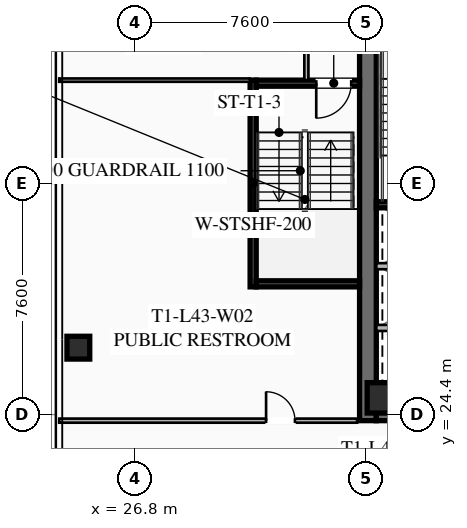
"""IFC4 building model, lengths in metres.
Left out: names, types, materials, properties, quantities, classifications, styles, units other than length and angle.
Written with IfcOpenShell. Run it as: python <this file> out.ifc"""

import sys

from ifc_helpers import new_model, si_unit, direction, frame, frame_2d, origin, origin_2d, place, context, subcontext, project, spatial, rectangle, hollow_rectangle, extrude, element, fill, save


model = new_model("IFC4")
c1 = context("Model", 3, precision=1e-05, world=origin(), true_north=direction((0.0, 1.0)))
c2 = subcontext(c1, "Body", "Model", "MODEL_VIEW")
j1 = project(units=[si_unit("LENGTHUNIT", "METRE"), si_unit("PLANEANGLEUNIT", "RADIAN")], contexts=[c1])
p1 = place(None, origin())
s1 = spatial("IfcSite", under=j1, at=p1, CompositionType="ELEMENT")
p2 = place(p1, origin())
s2 = spatial("IfcBuilding", under=s1, at=p2, CompositionType="ELEMENT")
p3 = place(p2, frame((0.0, 0.0, 160.55)))
s3 = spatial("IfcBuildingStorey", under=s2, at=p3, CompositionType="ELEMENT", Elevation=160.55)
p4 = place(p3, frame((34.475, 24.2, 0.0), z_axis=(0.0, 0.0, 1.0), x_axis=(0.0, 1.0, 0.0)))
e1 = element("IfcWall", 1, at=p4, inside=s3, PredefinedType="SHEAR", context=c2, shape_type="SweptSolid", body=[
    extrude(rectangle(XDim=15.6, YDim=0.55, at=frame_2d((7.8, 0.0))), origin(), (0.0, 0.0, 1.0), 3.55),
])
p5 = place(p3, frame((49.25, 24.475, 0.0), z_axis=(0.0, 0.0, 1.0), x_axis=(-1.0, 0.0, 0.0)))
e2 = element("IfcWall", 2, at=p5, inside=s3, PredefinedType="SHEAR", context=c2, shape_type="SweptSolid", body=[
    extrude(rectangle(XDim=14.5, YDim=0.55, at=frame_2d((7.25, 0.0))), origin(), (0.0, 0.0, 1.0), 3.55),
])
p6 = place(p5, frame((8.95, 0.0, 0.0)))
e3 = element("IfcOpeningElement", 3, at=p6, cuts=e2, PredefinedType="OPENING", context=c2, shape_type="SweptSolid", body=[
    extrude(rectangle(XDim=1.25, YDim=2.25, at=frame_2d((0.625, 1.125))), frame((0.0, 0.285, 0.0), z_axis=(0.0, -1.0, 0.0), x_axis=(1.0, 0.0, 0.0)), (0.0, 0.0, 1.0), 0.57),
])
p7 = place(p5, frame((3.9, 0.0, 0.0)))
e4 = element("IfcOpeningElement", 4, at=p7, cuts=e2, PredefinedType="OPENING", context=c2, shape_type="SweptSolid", body=[
    extrude(rectangle(XDim=1.25, YDim=2.25, at=frame_2d((0.625, 1.125))), frame((0.0, 0.285, 0.0), z_axis=(0.0, -1.0, 0.0), x_axis=(1.0, 0.0, 0.0)), (0.0, 0.0, 1.0), 0.57),
])
p8 = place(p3, frame((34.95, 24.95, 0.0), z_axis=(0.0, 0.0, 1.0), x_axis=(1.0, 0.0, 0.0)))
e5 = element("IfcColumn", 5, at=p8, inside=s3, PredefinedType="COLUMN", context=c2, shape_type="SweptSolid", body=[
    extrude(hollow_rectangle(XDim=1.0, YDim=1.0, WallThickness=0.04, at=origin_2d()), origin(), (0.0, 0.0, 1.0), 3.37),
])
p9 = place(p3, frame((24.95, 26.6, 0.0), z_axis=(0.0, 0.0, 1.0), x_axis=(1.0, 0.0, 0.0)))
e6 = element("IfcColumn", 6, at=p9, inside=s3, PredefinedType="COLUMN", context=c2, shape_type="SweptSolid", body=[
    extrude(hollow_rectangle(XDim=0.75, YDim=0.75, WallThickness=0.032, at=origin_2d()), origin(), (0.0, 0.0, 1.0), 3.37),
])
p10 = place(p3, frame((34.75, 31.3, 0.0), z_axis=(0.0, 0.0, 1.0), x_axis=(1.0, 0.0, 0.0)))
e7 = element("IfcWall", 7, at=p10, inside=s3, PredefinedType="SHEAR", context=c2, shape_type="SweptSolid", body=[
    extrude(rectangle(XDim=3.55, YDim=0.2, at=frame_2d((1.775, 0.0))), origin(), (0.0, 0.0, 1.0), 3.37),
])
for number, where, z_axis, x_axis in (
    (8, (34.75, 27.25, 0.0), (0.0, 0.0, 1.0), (1.0, 0.0, 0.0)),
    (9, (34.75, 29.28, 0.0), (0.0, 0.0, 1.0), (1.0, 0.0, 0.0)),
):
    element("IfcWall", number, at=place(p3, frame(where, z_axis=z_axis, x_axis=x_axis)), inside=s3, PredefinedType="SOLIDWALL", context=c2, shape_type="SweptSolid", body=[
        extrude(rectangle(XDim=3.2, YDim=0.2, at=frame_2d((1.6, 0.0))), origin(), (0.0, 0.0, 1.0), 3.37),
    ])
p11 = place(p3, frame((30.7, 28.6, 0.0), z_axis=(0.0, 0.0, 1.0), x_axis=(0.0, 1.0, 0.0)))
e10 = element("IfcWall", 10, at=p11, inside=s3, PredefinedType="SHEAR", context=c2, shape_type="SweptSolid", body=[
    extrude(rectangle(XDim=6.8, YDim=0.2, at=frame_2d((3.4, 0.0))), origin(), (0.0, 0.0, 1.0), 3.37),
])
p12 = place(p3, frame((34.2, 35.3, 0.0), z_axis=(0.0, 0.0, 1.0), x_axis=(-1.0, 0.0, 0.0)))
e11 = element("IfcWall", 11, at=p12, inside=s3, PredefinedType="SHEAR", context=c2, shape_type="SweptSolid", body=[
    extrude(rectangle(XDim=3.4, YDim=0.2, at=frame_2d((1.7, 0.0))), origin(), (0.0, 0.0, 1.0), 3.37),
])
p13 = place(p12, frame((0.275, 0.0, 0.0)))
e12 = element("IfcOpeningElement", 12, at=p13, cuts=e11, PredefinedType="OPENING", context=c2, shape_type="SweptSolid", body=[
    extrude(rectangle(XDim=1.15, YDim=2.2, at=frame_2d((0.575, 1.1))), frame((0.0, 0.11, 0.0), z_axis=(0.0, -1.0, 0.0), x_axis=(1.0, 0.0, 0.0)), (0.0, 0.0, 1.0), 0.22),
])
p14 = place(p3, frame((30.8, 28.7, 0.0), z_axis=(0.0, 0.0, 1.0), x_axis=(1.0, 0.0, 0.0)))
e13 = element("IfcWall", 13, at=p14, inside=s3, PredefinedType="SHEAR", context=c2, shape_type="SweptSolid", body=[
    extrude(rectangle(XDim=3.4, YDim=0.2, at=frame_2d((1.7, 0.0))), origin(), (0.0, 0.0, 1.0), 3.37),
])
p15 = place(p3, frame((32.45, 35.4, 0.0), z_axis=(0.0, 0.0, 1.0), x_axis=(0.0, 1.0, 0.0)))
e14 = element("IfcWall", 14, at=p15, inside=s3, PredefinedType="PARTITIONING", context=c2, shape_type="SweptSolid", body=[
    extrude(rectangle(XDim=4.4, YDim=0.135, at=frame_2d((2.2, 0.0))), origin(), (0.0, 0.0, 1.0), 2.723),
])
p16 = place(p3, frame((24.32, 24.2, 0.0), z_axis=(0.0, 0.0, 1.0), x_axis=(1.0, 0.0, 0.0)))
e15 = element("IfcWall", 15, at=p16, inside=s3, PredefinedType="PARTITIONING", context=c2, shape_type="SweptSolid", body=[
    extrude(rectangle(XDim=9.8, YDim=0.135, at=frame_2d((4.9, 0.0))), origin(), (0.0, 0.0, 1.0), 2.723),
])
p17 = place(p16, frame((6.805, 0.0, 0.0)))
e16 = element("IfcOpeningElement", 16, at=p17, cuts=e15, PredefinedType="OPENING", context=c2, shape_type="SweptSolid", body=[
    extrude(rectangle(XDim=0.95, YDim=2.05, at=frame_2d((0.475, 1.025))), frame((0.0, 0.077, 0.0), z_axis=(0.0, -1.0, 0.0), x_axis=(1.0, 0.0, 0.0)), (0.0, 0.0, 1.0), 0.155),
])
p18 = place(p3, frame((30.6, 35.4, 0.0), z_axis=(0.0, 0.0, 1.0), x_axis=(-1.0, 0.0, 0.0)))
e17 = element("IfcWall", 17, at=p18, inside=s3, PredefinedType="PARTITIONING", context=c2, shape_type="SweptSolid", body=[
    extrude(rectangle(XDim=6.28, YDim=0.11, at=frame_2d((3.14, 0.0))), origin(), (0.0, 0.0, 1.0), 2.723),
])
p19 = place(p13, origin())
e18 = element("IfcDoor", 18, at=p19, inside=s3, OperationType="SINGLE_SWING_RIGHT", PredefinedType="DOOR", context=c2, shape_type="SweptSolid", body=[
    extrude(rectangle(XDim=1.15, YDim=2.2, at=frame_2d((0.575, 1.1))), frame((0.0, 0.025, 0.0), z_axis=(0.0, -1.0, 0.0), x_axis=(1.0, 0.0, 0.0)), (0.0, 0.0, 1.0), 0.05),
])
fill(e12, e18)
p20 = place(p17, origin())
e19 = element("IfcDoor", 19, at=p20, inside=s3, OperationType="SINGLE_SWING_LEFT", PredefinedType="DOOR", context=c2, shape_type="SweptSolid", body=[
    extrude(rectangle(XDim=0.95, YDim=2.05, at=frame_2d((0.475, 1.025))), frame((0.0, 0.025, 0.0), z_axis=(0.0, -1.0, 0.0), x_axis=(1.0, 0.0, 0.0)), (0.0, 0.0, 1.0), 0.05),
])
fill(e16, e19)
save(model, sys.argv[1])
